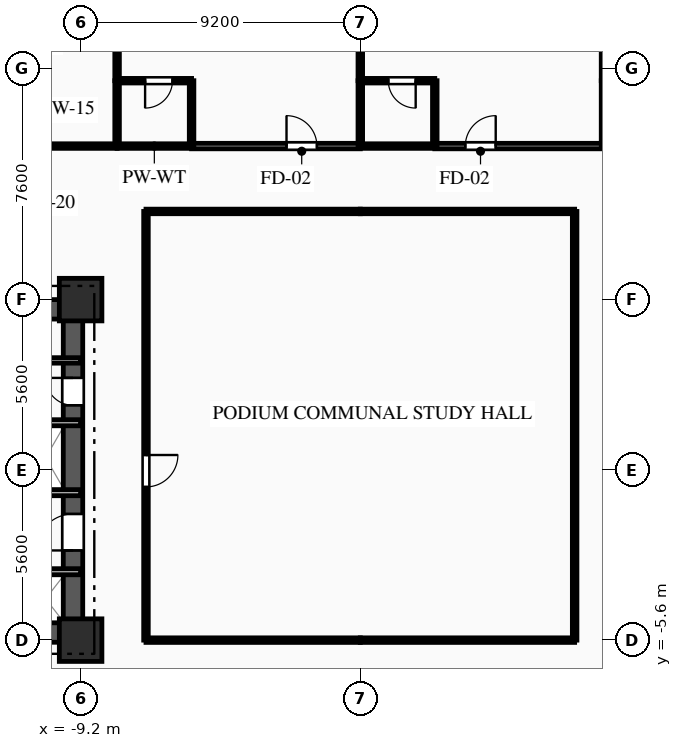
"""IFC4 building model, lengths in metres.
Left out: names, types, materials, properties, quantities, classifications, styles, units other than length and angle.
Written with IfcOpenShell. Run it as: python <this file> out.ifc"""

import sys

from ifc_helpers import new_model, si_unit, direction, frame, frame_2d, origin, origin_2d, place, context, subcontext, project, spatial, rectangle, extrude, element, fill, save


model = new_model("IFC4")
c1 = context("Model", 3, precision=1e-05, world=origin(), true_north=direction((0.0, 1.0)))
c2 = subcontext(c1, "Body", "Model", "MODEL_VIEW")
j1 = project(units=[si_unit("LENGTHUNIT", "METRE"), si_unit("PLANEANGLEUNIT", "RADIAN")], contexts=[c1])
p1 = place(None, origin())
s1 = spatial("IfcSite", under=j1, at=p1, CompositionType="ELEMENT")
p2 = place(p1, origin())
s2 = spatial("IfcBuilding", under=s1, at=p2, CompositionType="ELEMENT")
p3 = place(p2, frame((0.0, 0.0, 18.0)))
s3 = spatial("IfcBuildingStorey", under=s2, at=p3, CompositionType="ELEMENT", Elevation=18.0)
for number, where, z_axis, x_axis in (
    (1, (-9.2, -5.6, 0.0), (0.0, 0.0, 1.0), (1.0, 0.0, 0.0)),
    (2, (-9.2, 5.6, 0.0), (0.0, 0.0, 1.0), (1.0, 0.0, 0.0)),
):
    element("IfcColumn", number, at=place(p3, frame(where, z_axis=z_axis, x_axis=x_axis)), inside=s3, PredefinedType="COLUMN", context=c2, shape_type="SweptSolid", body=[
        extrude(rectangle(XDim=1.4, YDim=1.4, at=origin_2d()), origin(), (0.0, 0.0, 1.0), 4.5),
    ])
p4 = place(p3, frame((-18.8, 5.28, 0.0), z_axis=(0.0, 0.0, 1.0), x_axis=(1.0, 0.0, 0.0)))
e3 = element("IfcWall", 3, at=p4, inside=s3, PredefinedType="SHEAR", context=c2, shape_type="SweptSolid", body=[
    extrude(rectangle(XDim=9.6, YDim=0.64, at=frame_2d((4.8, 0.0))), origin(), (0.0, 0.0, 1.0), 4.17),
])
p5 = place(p4, frame((1.55, 0.0, 0.0)))
e4 = element("IfcOpeningElement", 4, at=p5, cuts=e3, PredefinedType="OPENING", context=c2, shape_type="SweptSolid", body=[
    extrude(rectangle(XDim=1.1, YDim=2.15, at=frame_2d((0.55, 1.075))), frame((0.0, 0.33, 0.0), z_axis=(0.0, -1.0, 0.0), x_axis=(1.0, 0.0, 0.0)), (0.0, 0.0, 1.0), 0.66),
])
p6 = place(p4, frame((4.775, 0.0, 0.0)))
e5 = element("IfcOpeningElement", 5, at=p6, cuts=e3, PredefinedType="OPENING", context=c2, shape_type="SweptSolid", body=[
    extrude(rectangle(XDim=1.05, YDim=2.1, at=frame_2d((0.525, 1.05))), frame((0.0, 0.33, 0.0), z_axis=(0.0, -1.0, 0.0), x_axis=(1.0, 0.0, 0.0)), (0.0, 0.0, 1.0), 0.66),
])
p7 = place(p3, frame((-18.8, -5.35, 0.0), z_axis=(0.0, 0.0, 1.0), x_axis=(1.0, 0.0, 0.0)))
e6 = element("IfcWall", 6, at=p7, inside=s3, PredefinedType="SHEAR", context=c2, shape_type="SweptSolid", body=[
    extrude(rectangle(XDim=9.6, YDim=0.64, at=frame_2d((4.8, 0.0))), origin(), (0.0, 0.0, 1.0), 4.17),
])
p8 = place(p7, frame((1.05, 0.0, 0.0)))
e7 = element("IfcOpeningElement", 7, at=p8, cuts=e6, PredefinedType="OPENING", context=c2, shape_type="SweptSolid", body=[
    extrude(rectangle(XDim=0.9, YDim=2.1, at=frame_2d((0.45, 1.05))), frame((0.0, 0.33, 0.0), z_axis=(0.0, -1.0, 0.0), x_axis=(1.0, 0.0, 0.0)), (0.0, 0.0, 1.0), 0.66),
])
p9 = place(p3, frame((-9.45, -5.05, 0.0), z_axis=(0.0, 0.0, 1.0), x_axis=(0.0, 1.0, 0.0)))
e8 = element("IfcWall", 8, at=p9, inside=s3, PredefinedType="SHEAR", context=c2, shape_type="SweptSolid", body=[
    extrude(rectangle(XDim=10.1, YDim=0.64, at=frame_2d((5.05, 0.0))), origin(), (0.0, 0.0, 1.0), 4.17),
])
p10 = place(p9, frame((7.175, 0.0, 0.0)))
e9 = element("IfcOpeningElement", 9, at=p10, cuts=e8, PredefinedType="OPENING", context=c2, shape_type="SweptSolid", body=[
    extrude(rectangle(XDim=0.9, YDim=2.1, at=frame_2d((0.45, 1.05))), frame((0.0, 0.33, 0.0), z_axis=(0.0, -1.0, 0.0), x_axis=(1.0, 0.0, 0.0)), (0.0, 0.0, 1.0), 0.66),
])
p11 = place(p9, frame((2.4, 0.0, 0.0)))
e10 = element("IfcOpeningElement", 10, at=p11, cuts=e8, PredefinedType="OPENING", context=c2, shape_type="SweptSolid", body=[
    extrude(rectangle(XDim=1.2, YDim=2.15, at=frame_2d((0.6, 1.075))), frame((0.0, 0.33, 0.0), z_axis=(0.0, -1.0, 0.0), x_axis=(1.0, 0.0, 0.0)), (0.0, 0.0, 1.0), 0.66),
])
p12 = place(p3, frame((-9.2, 3.6, 0.0), z_axis=(0.0, 0.0, 1.0), x_axis=(-1.0, 0.0, 0.0)))
e11 = element("IfcWall", 11, at=p12, inside=s3, PredefinedType="PARTITIONING", context=c2, shape_type="SweptSolid", body=[
    extrude(rectangle(XDim=2.95, YDim=0.18, at=frame_2d((1.475, 0.0))), origin(), (0.0, 0.0, 1.0), 4.17),
])
p13 = place(p12, frame((1.7, 0.0, 0.0)))
e12 = element("IfcOpeningElement", 12, at=p13, cuts=e11, PredefinedType="OPENING", context=c2, shape_type="SweptSolid", body=[
    extrude(rectangle(XDim=0.9, YDim=2.1, at=frame_2d((0.45, 1.05))), frame((0.0, 0.1, 0.0), z_axis=(0.0, -1.0, 0.0), x_axis=(1.0, 0.0, 0.0)), (0.0, 0.0, 1.0), 0.2),
])
p14 = place(p3, frame((-11.08, -3.35, 0.0), z_axis=(0.0, 0.0, 1.0), x_axis=(1.0, 0.0, 0.0)))
e13 = element("IfcWall", 13, at=p14, inside=s3, PredefinedType="PARTITIONING", context=c2, shape_type="SweptSolid", body=[
    extrude(rectangle(XDim=1.88, YDim=0.2, at=frame_2d((0.94, 0.0))), origin(), (0.0, 0.0, 1.0), 3.885),
])
p15 = place(p3, frame((-9.2, -0.75, 0.0), z_axis=(0.0, 0.0, 1.0), x_axis=(-1.0, 0.0, 0.0)))
e14 = element("IfcWall", 14, at=p15, inside=s3, PredefinedType="PARTITIONING", context=c2, shape_type="SweptSolid", body=[
    extrude(rectangle(XDim=1.88, YDim=0.2, at=frame_2d((0.94, 0.0))), origin(), (0.0, 0.0, 1.0), 4.17),
])
p16 = place(p3, frame((-13.65, 10.65, 0.0), z_axis=(0.0, 0.0, 1.0), x_axis=(1.0, 0.0, 0.0)))
e15 = element("IfcWall", 15, at=p16, inside=s3, PredefinedType="PARTITIONING", context=c2, shape_type="SweptSolid", body=[
    extrude(rectangle(XDim=5.65, YDim=0.15, at=frame_2d((2.825, 0.0))), origin(), (0.0, 0.0, 1.0), 4.17),
])
p17 = place(p16, frame((1.022, 0.0, 0.0)))
e16 = element("IfcOpeningElement", 16, at=p17, cuts=e15, PredefinedType="OPENING", context=c2, shape_type="SweptSolid", body=[
    extrude(rectangle(XDim=0.95, YDim=2.1, at=frame_2d((0.475, 1.05))), frame((0.0, 0.085, 0.0), z_axis=(0.0, -1.0, 0.0), x_axis=(1.0, 0.0, 0.0)), (0.0, 0.0, 1.0), 0.17),
])
p18 = place(p3, frame((-5.55, 10.65, 0.0), z_axis=(0.0, 0.0, 1.0), x_axis=(1.0, 0.0, 0.0)))
e17 = element("IfcWall", 17, at=p18, inside=s3, PredefinedType="PARTITIONING", context=c2, shape_type="SweptSolid", body=[
    extrude(rectangle(XDim=5.55, YDim=0.18, at=frame_2d((2.775, 0.0))), origin(), (0.0, 0.0, 1.0), 4.17),
])
p19 = place(p18, frame((3.123, 0.0, 0.0)))
e18 = element("IfcOpeningElement", 18, at=p19, cuts=e17, PredefinedType="OPENING", context=c2, shape_type="SweptSolid", body=[
    extrude(rectangle(XDim=1.0, YDim=2.15, at=frame_2d((0.5, 1.075))), frame((0.0, 0.1, 0.0), z_axis=(0.0, -1.0, 0.0), x_axis=(1.0, 0.0, 0.0)), (0.0, 0.0, 1.0), 0.2),
])
p20 = place(p3, frame((-8.0, 10.65, 0.0), z_axis=(0.0, 0.0, 1.0), x_axis=(1.0, 0.0, 0.0)))
e19 = element("IfcWall", 19, at=p20, inside=s3, PredefinedType="PLUMBINGWALL", context=c2, shape_type="SweptSolid", body=[
    extrude(rectangle(XDim=2.45, YDim=0.15, at=frame_2d((1.225, 0.0))), origin(), (0.0, 0.0, 1.0), 4.17),
])
p21 = place(p3, frame((0.0, 8.5, 0.0), z_axis=(0.0, 0.0, 1.0), x_axis=(-1.0, 0.0, 0.0)))
e20 = element("IfcWall", 20, at=p21, inside=s3, PredefinedType="PARTITIONING", context=c2, shape_type="SweptSolid", body=[
    extrude(rectangle(XDim=7.05, YDim=0.15, at=frame_2d((3.525, 0.0))), origin(), (0.0, 0.0, 1.0), 4.17),
])
p22 = place(p3, frame((2.45, 10.65, 0.0), z_axis=(0.0, 0.0, 1.0), x_axis=(1.0, 0.0, 0.0)))
e21 = element("IfcWall", 21, at=p22, inside=s3, PredefinedType="PARTITIONING", context=c2, shape_type="SweptSolid", body=[
    extrude(rectangle(XDim=5.55, YDim=0.18, at=frame_2d((2.775, 0.0))), origin(), (0.0, 0.0, 1.0), 4.17),
])
p23 = place(p22, frame((1.004, 0.0, 0.0)))
e22 = element("IfcOpeningElement", 22, at=p23, cuts=e21, PredefinedType="OPENING", context=c2, shape_type="SweptSolid", body=[
    extrude(rectangle(XDim=1.0, YDim=2.15, at=frame_2d((0.5, 1.075))), frame((0.0, 0.1, 0.0), z_axis=(0.0, -1.0, 0.0), x_axis=(1.0, 0.0, 0.0)), (0.0, 0.0, 1.0), 0.2),
])
p24 = place(p3, frame((0.0, 10.65, 0.0), z_axis=(0.0, 0.0, 1.0), x_axis=(1.0, 0.0, 0.0)))
e23 = element("IfcWall", 23, at=p24, inside=s3, PredefinedType="PLUMBINGWALL", context=c2, shape_type="SweptSolid", body=[
    extrude(rectangle(XDim=2.45, YDim=0.15, at=frame_2d((1.225, 0.0))), origin(), (0.0, 0.0, 1.0), 4.17),
])
p25 = place(p3, frame((7.05, 8.5, 0.0), z_axis=(0.0, 0.0, 1.0), x_axis=(-1.0, 0.0, 0.0)))
e24 = element("IfcWall", 24, at=p25, inside=s3, PredefinedType="PARTITIONING", context=c2, shape_type="SweptSolid", body=[
    extrude(rectangle(XDim=7.05, YDim=0.15, at=frame_2d((3.525, 0.0))), origin(), (0.0, 0.0, 1.0), 4.17),
])
for number, where, z_axis, x_axis in (
    (25, (-7.05, -5.6, 0.0), (0.0, 0.0, 1.0), (1.0, 0.0, 0.0)),
    (26, (0.0, -5.6, 0.0), (0.0, 0.0, 1.0), (1.0, 0.0, 0.0)),
):
    element("IfcWall", number, at=place(p3, frame(where, z_axis=z_axis, x_axis=x_axis)), inside=s3, PredefinedType="PARTITIONING", context=c2, shape_type="SweptSolid", body=[
        extrude(rectangle(XDim=7.05, YDim=0.15, at=frame_2d((3.525, 0.0))), origin(), (0.0, 0.0, 1.0), 3.655),
    ])
p26 = place(p3, frame((-7.05, 8.5, 0.0), z_axis=(0.0, 0.0, 1.0), x_axis=(0.0, -1.0, 0.0)))
e27 = element("IfcWall", 27, at=p26, inside=s3, PredefinedType="PARTITIONING", context=c2, shape_type="SweptSolid", body=[
    extrude(rectangle(XDim=14.1, YDim=0.15, at=frame_2d((7.05, 0.0))), origin(), (0.0, 0.0, 1.0), 4.17),
])
p27 = place(p26, frame((8.011, 0.0, 0.0)))
e28 = element("IfcOpeningElement", 28, at=p27, cuts=e27, PredefinedType="OPENING", context=c2, shape_type="SweptSolid", body=[
    extrude(rectangle(XDim=1.05, YDim=2.15, at=frame_2d((0.525, 1.075))), frame((0.0, 0.085, 0.0), z_axis=(0.0, -1.0, 0.0), x_axis=(1.0, 0.0, 0.0)), (0.0, 0.0, 1.0), 0.17),
])
p28 = place(p3, frame((7.05, -5.6, 0.0), z_axis=(0.0, 0.0, 1.0), x_axis=(0.0, 1.0, 0.0)))
e29 = element("IfcWall", 29, at=p28, inside=s3, PredefinedType="PARTITIONING", context=c2, shape_type="SweptSolid", body=[
    extrude(rectangle(XDim=14.1, YDim=0.15, at=frame_2d((7.05, 0.0))), origin(), (0.0, 0.0, 1.0), 4.17),
])
p29 = place(p3, frame((-8.0, 24.8, 0.0), z_axis=(0.0, 0.0, 1.0), x_axis=(0.0, -1.0, 0.0)))
e30 = element("IfcWall", 30, at=p29, inside=s3, PredefinedType="PARTITIONING", context=c2, shape_type="SweptSolid", body=[
    extrude(rectangle(XDim=12.0, YDim=0.15, at=frame_2d((6.0, 0.0))), origin(), (0.0, 0.0, 1.0), 4.17),
])
p30 = place(p3, frame((-8.0, 12.8, 0.0), z_axis=(0.0, 0.0, 1.0), x_axis=(0.0, -1.0, 0.0)))
e31 = element("IfcWall", 31, at=p30, inside=s3, PredefinedType="PLUMBINGWALL", context=c2, shape_type="SweptSolid", body=[
    extrude(rectangle(XDim=2.15, YDim=0.15, at=frame_2d((1.075, 0.0))), origin(), (0.0, 0.0, 1.0), 4.17),
])
p31 = place(p3, frame((-5.55, 12.8, 0.0), z_axis=(0.0, 0.0, 1.0), x_axis=(-1.0, 0.0, 0.0)))
e32 = element("IfcWall", 32, at=p31, inside=s3, PredefinedType="PLUMBINGWALL", context=c2, shape_type="SweptSolid", body=[
    extrude(rectangle(XDim=2.45, YDim=0.15, at=frame_2d((1.225, 0.0))), origin(), (0.0, 0.0, 1.0), 4.17),
])
p32 = place(p31, frame((0.629, 0.0, 0.0)))
e33 = element("IfcOpeningElement", 33, at=p32, cuts=e32, PredefinedType="OPENING", context=c2, shape_type="SweptSolid", body=[
    extrude(rectangle(XDim=0.9, YDim=2.1, at=frame_2d((0.45, 1.05))), frame((0.0, 0.085, 0.0), z_axis=(0.0, -1.0, 0.0), x_axis=(1.0, 0.0, 0.0)), (0.0, 0.0, 1.0), 0.17),
])
p33 = place(p3, frame((-5.55, 10.65, 0.0), z_axis=(0.0, 0.0, 1.0), x_axis=(0.0, 1.0, 0.0)))
e34 = element("IfcWall", 34, at=p33, inside=s3, PredefinedType="PLUMBINGWALL", context=c2, shape_type="SweptSolid", body=[
    extrude(rectangle(XDim=2.15, YDim=0.15, at=frame_2d((1.075, 0.0))), origin(), (0.0, 0.0, 1.0), 4.17),
])
p34 = place(p3, frame((0.0, 24.8, 0.0), z_axis=(0.0, 0.0, 1.0), x_axis=(0.0, -1.0, 0.0)))
e35 = element("IfcWall", 35, at=p34, inside=s3, PredefinedType="PARTITIONING", context=c2, shape_type="SweptSolid", body=[
    extrude(rectangle(XDim=12.0, YDim=0.15, at=frame_2d((6.0, 0.0))), origin(), (0.0, 0.0, 1.0), 3.555),
])
p35 = place(p3, frame((0.0, 12.8, 0.0), z_axis=(0.0, 0.0, 1.0), x_axis=(0.0, -1.0, 0.0)))
e36 = element("IfcWall", 36, at=p35, inside=s3, PredefinedType="PLUMBINGWALL", context=c2, shape_type="SweptSolid", body=[
    extrude(rectangle(XDim=2.15, YDim=0.15, at=frame_2d((1.075, 0.0))), origin(), (0.0, 0.0, 1.0), 4.17),
])
p36 = place(p3, frame((2.45, 12.8, 0.0), z_axis=(0.0, 0.0, 1.0), x_axis=(-1.0, 0.0, 0.0)))
e37 = element("IfcWall", 37, at=p36, inside=s3, PredefinedType="PLUMBINGWALL", context=c2, shape_type="SweptSolid", body=[
    extrude(rectangle(XDim=2.45, YDim=0.15, at=frame_2d((1.225, 0.0))), origin(), (0.0, 0.0, 1.0), 4.17),
])
p37 = place(p36, frame((0.629, 0.0, 0.0)))
e38 = element("IfcOpeningElement", 38, at=p37, cuts=e37, PredefinedType="OPENING", context=c2, shape_type="SweptSolid", body=[
    extrude(rectangle(XDim=0.9, YDim=2.1, at=frame_2d((0.45, 1.05))), frame((0.0, 0.085, 0.0), z_axis=(0.0, -1.0, 0.0), x_axis=(1.0, 0.0, 0.0)), (0.0, 0.0, 1.0), 0.17),
])
p38 = place(p3, frame((2.45, 10.65, 0.0), z_axis=(0.0, 0.0, 1.0), x_axis=(0.0, 1.0, 0.0)))
e39 = element("IfcWall", 39, at=p38, inside=s3, PredefinedType="PLUMBINGWALL", context=c2, shape_type="SweptSolid", body=[
    extrude(rectangle(XDim=2.15, YDim=0.15, at=frame_2d((1.075, 0.0))), origin(), (0.0, 0.0, 1.0), 4.17),
])
p39 = place(p3, frame((8.0, 24.8, 0.0), z_axis=(0.0, 0.0, 1.0), x_axis=(0.0, -1.0, 0.0)))
e40 = element("IfcWall", 40, at=p39, inside=s3, PredefinedType="PARTITIONING", context=c2, shape_type="SweptSolid", body=[
    extrude(rectangle(XDim=12.0, YDim=0.15, at=frame_2d((6.0, 0.0))), origin(), (0.0, 0.0, 1.0), 4.17),
])
p40 = place(p3, frame((8.0, 12.8, 0.0), z_axis=(0.0, 0.0, 1.0), x_axis=(0.0, -1.0, 0.0)))
e41 = element("IfcWall", 41, at=p40, inside=s3, PredefinedType="PLUMBINGWALL", context=c2, shape_type="SweptSolid", body=[
    extrude(rectangle(XDim=2.15, YDim=0.15, at=frame_2d((1.075, 0.0))), origin(), (0.0, 0.0, 1.0), 4.17),
])
p41 = place(p3, frame((-15.05, 1.55, 0.0), z_axis=(0.0, 0.0, 1.0), x_axis=(1.0, 0.0, 0.0)))
e42 = element("IfcWall", 42, at=p41, inside=s3, PredefinedType="PARTITIONING", context=c2, shape_type="SweptSolid", body=[
    extrude(rectangle(XDim=5.85, YDim=0.2, at=frame_2d((2.925, 0.0))), origin(), (0.0, 0.0, 1.0), 4.17),
])
p42 = place(p10, origin())
e43 = element("IfcDoor", 43, at=p42, inside=s3, OperationType="SINGLE_SWING_RIGHT", PredefinedType="DOOR", context=c2, shape_type="SweptSolid", body=[
    extrude(rectangle(XDim=0.9, YDim=2.1, at=frame_2d((0.45, 1.05))), frame((0.0, 0.025, 0.0), z_axis=(0.0, -1.0, 0.0), x_axis=(1.0, 0.0, 0.0)), (0.0, 0.0, 1.0), 0.05),
])
fill(e9, e43)
p43 = place(p11, origin())
e44 = element("IfcDoor", 44, at=p43, inside=s3, OperationType="SINGLE_SWING_LEFT", PredefinedType="DOOR", context=c2, shape_type="SweptSolid", body=[
    extrude(rectangle(XDim=1.2, YDim=2.15, at=frame_2d((0.6, 1.075))), frame((0.0, 0.025, 0.0), z_axis=(0.0, -1.0, 0.0), x_axis=(1.0, 0.0, 0.0)), (0.0, 0.0, 1.0), 0.05),
])
fill(e10, e44)
p44 = place(p19, origin())
e45 = element("IfcDoor", 45, at=p44, inside=s3, OperationType="SINGLE_SWING_LEFT", PredefinedType="DOOR", context=c2, shape_type="SweptSolid", body=[
    extrude(rectangle(XDim=1.0, YDim=2.15, at=frame_2d((0.5, 1.075))), frame((0.0, 0.025, 0.0), z_axis=(0.0, -1.0, 0.0), x_axis=(1.0, 0.0, 0.0)), (0.0, 0.0, 1.0), 0.05),
])
fill(e18, e45)
p45 = place(p23, origin())
e46 = element("IfcDoor", 46, at=p45, inside=s3, OperationType="SINGLE_SWING_RIGHT", PredefinedType="DOOR", context=c2, shape_type="SweptSolid", body=[
    extrude(rectangle(XDim=1.0, YDim=2.15, at=frame_2d((0.5, 1.075))), frame((0.0, 0.025, 0.0), z_axis=(0.0, -1.0, 0.0), x_axis=(1.0, 0.0, 0.0)), (0.0, 0.0, 1.0), 0.05),
])
fill(e22, e46)
p46 = place(p27, origin())
e47 = element("IfcDoor", 47, at=p46, inside=s3, OperationType="SINGLE_SWING_LEFT", PredefinedType="DOOR", context=c2, shape_type="SweptSolid", body=[
    extrude(rectangle(XDim=1.05, YDim=2.15, at=frame_2d((0.525, 1.075))), frame((0.0, 0.025, 0.0), z_axis=(0.0, -1.0, 0.0), x_axis=(1.0, 0.0, 0.0)), (0.0, 0.0, 1.0), 0.05),
])
fill(e28, e47)
p47 = place(p32, origin())
e48 = element("IfcDoor", 48, at=p47, inside=s3, OperationType="SINGLE_SWING_RIGHT", PredefinedType="DOOR", context=c2, shape_type="SweptSolid", body=[
    extrude(rectangle(XDim=0.9, YDim=2.1, at=frame_2d((0.45, 1.05))), frame((0.0, 0.025, 0.0), z_axis=(0.0, -1.0, 0.0), x_axis=(1.0, 0.0, 0.0)), (0.0, 0.0, 1.0), 0.05),
])
fill(e33, e48)
p48 = place(p37, origin())
e49 = element("IfcDoor", 49, at=p48, inside=s3, OperationType="SINGLE_SWING_LEFT", PredefinedType="DOOR", context=c2, shape_type="SweptSolid", body=[
    extrude(rectangle(XDim=0.9, YDim=2.1, at=frame_2d((0.45, 1.05))), frame((0.0, 0.025, 0.0), z_axis=(0.0, -1.0, 0.0), x_axis=(1.0, 0.0, 0.0)), (0.0, 0.0, 1.0), 0.05),
])
fill(e38, e49)
save(model, sys.argv[1])
